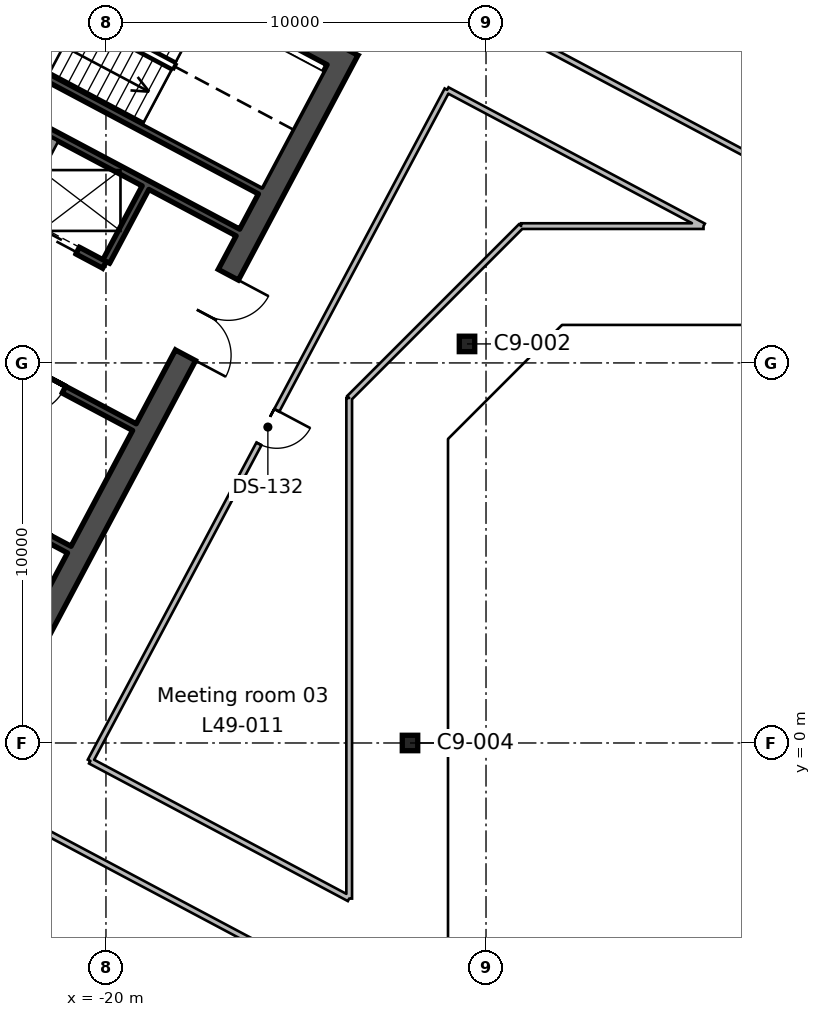
"""IFC4 building model, lengths in metres.
Left out: names, types, materials, properties, quantities, classifications, styles, units other than length and angle.
Written with IfcOpenShell. Run it as: python <this file> out.ifc"""

import sys

from ifc_helpers import new_model, si_unit, direction, frame, frame_2d, origin, origin_2d, place, context, subcontext, project, spatial, rectangle, hollow_rectangle, extrude, element, fill, save


model = new_model("IFC4")
c1 = context("Model", 3, precision=1e-05, world=origin(), true_north=direction((0.0, 1.0)))
c2 = subcontext(c1, "Body", "Model", "MODEL_VIEW")
j1 = project(units=[si_unit("LENGTHUNIT", "METRE"), si_unit("PLANEANGLEUNIT", "RADIAN")], contexts=[c1])
p1 = place(None, origin())
s1 = spatial("IfcSite", under=j1, at=p1, CompositionType="ELEMENT")
p2 = place(p1, origin())
s2 = spatial("IfcBuilding", under=s1, at=p2, CompositionType="ELEMENT")
p3 = place(p2, frame((0.0, 0.0, 224.7)))
s3 = spatial("IfcBuildingStorey", under=s2, at=p3, CompositionType="ELEMENT", Elevation=224.7)
for number, where, z_axis, x_axis in (
    (1, (-12.0, 0.0, 0.0), (0.0, 0.0, 1.0), (1.0, 0.0, 0.0)),
    (2, (-10.5, 10.5, 0.0), (0.0, 0.0, 1.0), (1.0, 0.0, 0.0)),
):
    element("IfcColumn", number, at=place(p3, frame(where, z_axis=z_axis, x_axis=x_axis)), inside=s3, PredefinedType="COLUMN", context=c2, shape_type="SweptSolid", body=[
        extrude(hollow_rectangle(XDim=0.406, YDim=0.406, WallThickness=0.015, InnerFilletRadius=0.007, OuterFilletRadius=0.022, at=origin_2d()), origin(), (0.0, 0.0, 1.0), 3.9),
    ])
p4 = place(p3, frame((-13.635, 18.236, 0.0), z_axis=(0.0, 0.0, 1.0), x_axis=(-0.469478769487, -0.88294376095, 0.0)))
e3 = element("IfcWall", 3, at=p4, inside=s3, PredefinedType="SHEAR", context=c2, shape_type="SweptSolid", body=[
    extrude(rectangle(XDim=19.4, YDim=0.6, at=frame_2d((9.7, 0.0))), origin(), (0.0, 0.0, 1.0), 3.9),
])
p5 = place(p4, frame((6.7, 0.0, 0.0)))
e4 = element("IfcOpeningElement", 4, at=p5, cuts=e3, PredefinedType="OPENING", context=c2, shape_type="SweptSolid", body=[
    extrude(rectangle(XDim=2.4, YDim=2.4, at=frame_2d((1.2, 1.2))), frame((0.0, 0.31, 0.0), z_axis=(0.0, -1.0, 0.0), x_axis=(1.0, 0.0, 0.0)), (0.0, 0.0, 1.0), 0.62),
])
p6 = place(p3, frame((-14.041, 18.112, 0.0), z_axis=(0.0, 0.0, 1.0), x_axis=(-0.882947755831, 0.46947125628, 0.0)))
e5 = element("IfcWall", 5, at=p6, inside=s3, PredefinedType="SHEAR", context=c2, shape_type="SweptSolid", body=[
    extrude(rectangle(XDim=20.2, YDim=0.6, at=frame_2d((10.1, 0.0))), origin(), (0.0, 0.0, 1.0), 3.9),
])
p7 = place(p3, frame((-18.96, 14.611, 0.0), z_axis=(0.0, 0.0, 1.0), x_axis=(-0.4694473164, -0.882960484464, 0.0)))
e6 = element("IfcWall", 6, at=p7, inside=s3, PredefinedType="SHEAR", context=c2, shape_type="SweptSolid", body=[
    extrude(rectangle(XDim=2.2, YDim=0.2, at=frame_2d((1.1, 0.0))), origin(), (0.0, 0.0, 1.0), 3.9),
])
p8 = place(p3, frame((-21.344, 15.879, 0.0), z_axis=(0.0, 0.0, 1.0), x_axis=(-0.4694473164, -0.882960484464, 0.0)))
e7 = element("IfcWall", 7, at=p8, inside=s3, PredefinedType="SOLIDWALL", context=c2, shape_type="SweptSolid", body=[
    extrude(rectangle(XDim=2.2, YDim=0.2, at=frame_2d((1.1, 0.0))), origin(), (0.0, 0.0, 1.0), 3.9),
])
p9 = place(p3, frame((-21.333, 21.649, 0.0), z_axis=(0.0, 0.0, 1.0), x_axis=(-0.469494272526, -0.882935517501, 0.0)))
e8 = element("IfcWall", 8, at=p9, inside=s3, PredefinedType="SHEAR", context=c2, shape_type="SweptSolid", body=[
    extrude(rectangle(XDim=7.3, YDim=0.2, at=frame_2d((3.65, 0.0))), origin(), (0.0, 0.0, 1.0), 3.9),
])
p10 = place(p9, frame((1.3, 0.0, 0.0)))
e9 = element("IfcOpeningElement", 9, at=p10, cuts=e8, PredefinedType="OPENING", context=c2, shape_type="SweptSolid", body=[
    extrude(rectangle(XDim=1.2, YDim=2.1, at=frame_2d((0.6, 1.05))), frame((0.0, 0.11, 0.0), z_axis=(0.0, -1.0, 0.0), x_axis=(1.0, 0.0, 0.0)), (0.0, 0.0, 1.0), 0.22),
])
p11 = place(p3, frame((-15.942, 14.536, 0.0), z_axis=(0.0, 0.0, 1.0), x_axis=(-0.882946947542, 0.469472776449, 0.0)))
e10 = element("IfcWall", 10, at=p11, inside=s3, PredefinedType="SHEAR", context=c2, shape_type="SweptSolid", body=[
    extrude(rectangle(XDim=8.0, YDim=0.2, at=frame_2d((4.0, 0.0))), origin(), (0.0, 0.0, 1.0), 3.9),
])
p12 = place(p3, frame((-16.529, 13.432, 0.0), z_axis=(0.0, 0.0, 1.0), x_axis=(-0.88295287151, 0.469461634952, 0.0)))
e11 = element("IfcWall", 11, at=p12, inside=s3, PredefinedType="SHEAR", context=c2, shape_type="SweptSolid", body=[
    extrude(rectangle(XDim=8.0, YDim=0.2, at=frame_2d((4.0, 0.0))), origin(), (0.0, 0.0, 1.0), 3.9),
])
p13 = place(p3, frame((-20.04, 12.581, 0.0), z_axis=(0.0, 0.0, 1.0), x_axis=(-0.882942972946, 0.469480251476, 0.0)))
e12 = element("IfcWall", 12, at=p13, inside=s3, PredefinedType="SHEAR", context=c2, shape_type="SweptSolid", body=[
    extrude(rectangle(XDim=5.4, YDim=0.2, at=frame_2d((2.7, 0.0))), origin(), (0.0, 0.0, 1.0), 3.9),
])
p14 = place(p13, frame((0.8, 0.0, 0.0)))
e13 = element("IfcOpeningElement", 13, at=p14, cuts=e12, PredefinedType="OPENING", context=c2, shape_type="SweptSolid", body=[
    extrude(rectangle(XDim=1.1, YDim=2.1, at=frame_2d((0.55, 1.05))), frame((0.0, 0.11, 0.0), z_axis=(0.0, -1.0, 0.0), x_axis=(1.0, 0.0, 0.0)), (0.0, 0.0, 1.0), 0.22),
])
p15 = place(p13, frame((3.5, 0.0, 0.0)))
e14 = element("IfcOpeningElement", 14, at=p15, cuts=e12, PredefinedType="OPENING", context=c2, shape_type="SweptSolid", body=[
    extrude(rectangle(XDim=1.1, YDim=2.1, at=frame_2d((0.55, 1.05))), frame((0.0, 0.11, 0.0), z_axis=(0.0, -1.0, 0.0), x_axis=(1.0, 0.0, 0.0)), (0.0, 0.0, 1.0), 0.22),
])
p16 = place(p3, frame((-19.252, 8.311, 0.0), z_axis=(0.0, 0.0, 1.0), x_axis=(-0.882955722218, 0.469456273365, 0.0)))
e15 = element("IfcWall", 15, at=p16, inside=s3, PredefinedType="SHEAR", context=c2, shape_type="SweptSolid", body=[
    extrude(rectangle(XDim=10.0, YDim=0.2, at=frame_2d((5.0, 0.0))), origin(), (0.0, 0.0, 1.0), 3.9),
])
p17 = place(p16, frame((2.1, 0.0, 0.0)))
e16 = element("IfcOpeningElement", 16, at=p17, cuts=e15, PredefinedType="OPENING", context=c2, shape_type="SweptSolid", body=[
    extrude(rectangle(XDim=1.2, YDim=2.1, at=frame_2d((0.6, 1.05))), frame((0.0, 0.11, 0.0), z_axis=(0.0, -1.0, 0.0), x_axis=(1.0, 0.0, 0.0)), (0.0, 0.0, 1.0), 0.22),
])
p18 = place(p16, frame((6.85, 0.0, 0.0)))
e17 = element("IfcOpeningElement", 17, at=p18, cuts=e15, PredefinedType="OPENING", context=c2, shape_type="SweptSolid", body=[
    extrude(rectangle(XDim=0.9, YDim=2.1, at=frame_2d((0.45, 1.05))), frame((0.0, 0.11, 0.0), z_axis=(0.0, -1.0, 0.0), x_axis=(1.0, 0.0, 0.0)), (0.0, 0.0, 1.0), 0.22),
])
p19 = place(p3, frame((-20.965, 5.088, 0.0), z_axis=(0.0, 0.0, 1.0), x_axis=(-0.882925986334, 0.469512196493, 0.0)))
e18 = element("IfcWall", 18, at=p19, inside=s3, PredefinedType="SHEAR", context=c2, shape_type="SweptSolid", body=[
    extrude(rectangle(XDim=4.5, YDim=0.2, at=frame_2d((2.25, 0.0))), origin(), (0.0, 0.0, 1.0), 3.9),
])
p20 = place(p19, frame((0.6, 0.0, 0.0)))
e19 = element("IfcOpeningElement", 19, at=p20, cuts=e18, PredefinedType="OPENING", context=c2, shape_type="SweptSolid", body=[
    extrude(rectangle(XDim=1.1, YDim=2.1, at=frame_2d((0.55, 1.05))), frame((0.0, 0.11, 0.0), z_axis=(0.0, -1.0, 0.0), x_axis=(1.0, 0.0, 0.0)), (0.0, 0.0, 1.0), 0.22),
])
p21 = place(p3, frame((-48.812, 39.771, 0.0), z_axis=(0.0, 0.0, 1.0), x_axis=(0.882945384259, -0.469475716535, 0.0)))
e20 = element("IfcWall", 20, at=p21, inside=s3, PredefinedType="PARTITIONING", context=c2, shape_type="SweptSolid", body=[
    extrude(rectangle(XDim=55.283, YDim=0.15, at=frame_2d((27.642, 0.0))), origin(), (0.0, 0.0, 1.0), 3.54),
])
p22 = place(p21, frame((39.55, 0.0, 0.0)))
e21 = element("IfcOpeningElement", 21, at=p22, cuts=e20, PredefinedType="OPENING", context=c2, shape_type="SweptSolid", body=[
    extrude(rectangle(XDim=1.0, YDim=2.1, at=frame_2d((0.5, 1.05))), frame((0.0, 0.085, 0.0), z_axis=(0.0, -1.0, 0.0), x_axis=(1.0, 0.0, 0.0)), (0.0, 0.0, 1.0), 0.17),
])
p23 = place(p21, frame((27.15, 0.0, 0.0)))
e22 = element("IfcOpeningElement", 22, at=p23, cuts=e20, PredefinedType="OPENING", context=c2, shape_type="SweptSolid", body=[
    extrude(rectangle(XDim=1.0, YDim=2.1, at=frame_2d((0.5, 1.05))), frame((0.0, 0.085, 0.0), z_axis=(0.0, -1.0, 0.0), x_axis=(1.0, 0.0, 0.0)), (0.0, 0.0, 1.0), 0.17),
])
p24 = place(p21, frame((21.25, 0.0, 0.0)))
e23 = element("IfcOpeningElement", 23, at=p24, cuts=e20, PredefinedType="OPENING", context=c2, shape_type="SweptSolid", body=[
    extrude(rectangle(XDim=1.0, YDim=2.1, at=frame_2d((0.5, 1.05))), frame((0.0, 0.085, 0.0), z_axis=(0.0, -1.0, 0.0), x_axis=(1.0, 0.0, 0.0)), (0.0, 0.0, 1.0), 0.17),
])
p25 = place(p21, frame((15.55, 0.0, 0.0)))
e24 = element("IfcOpeningElement", 24, at=p25, cuts=e20, PredefinedType="OPENING", context=c2, shape_type="SweptSolid", body=[
    extrude(rectangle(XDim=1.0, YDim=2.1, at=frame_2d((0.5, 1.05))), frame((0.0, 0.085, 0.0), z_axis=(0.0, -1.0, 0.0), x_axis=(1.0, 0.0, 0.0)), (0.0, 0.0, 1.0), 0.17),
])
p26 = place(p3, frame((-13.6, -6.586, 0.0), z_axis=(0.0, 0.0, 1.0), x_axis=(-0.882948083203, 0.469470640582, 0.0)))
e25 = element("IfcWall", 25, at=p26, inside=s3, PredefinedType="PARTITIONING", context=c2, shape_type="SweptSolid", body=[
    extrude(rectangle(XDim=36.556, YDim=0.15, at=frame_2d((18.278, 0.0))), origin(), (0.0, 0.0, 1.0), 3.54),
])
p27 = place(p26, frame((34.25, 0.0, 0.0)))
e26 = element("IfcOpeningElement", 26, at=p27, cuts=e25, PredefinedType="OPENING", context=c2, shape_type="SweptSolid", body=[
    extrude(rectangle(XDim=1.0, YDim=2.1, at=frame_2d((0.5, 1.05))), frame((0.0, 0.085, 0.0), z_axis=(0.0, -1.0, 0.0), x_axis=(1.0, 0.0, 0.0)), (0.0, 0.0, 1.0), 0.17),
])
p28 = place(p26, frame((25.65, 0.0, 0.0)))
e27 = element("IfcOpeningElement", 27, at=p28, cuts=e25, PredefinedType="OPENING", context=c2, shape_type="SweptSolid", body=[
    extrude(rectangle(XDim=1.0, YDim=2.1, at=frame_2d((0.5, 1.05))), frame((0.0, 0.085, 0.0), z_axis=(0.0, -1.0, 0.0), x_axis=(1.0, 0.0, 0.0)), (0.0, 0.0, 1.0), 0.17),
])
p29 = place(p26, frame((17.75, 0.0, 0.0)))
e28 = element("IfcOpeningElement", 28, at=p29, cuts=e25, PredefinedType="OPENING", context=c2, shape_type="SweptSolid", body=[
    extrude(rectangle(XDim=1.0, YDim=2.1, at=frame_2d((0.5, 1.05))), frame((0.0, 0.085, 0.0), z_axis=(0.0, -1.0, 0.0), x_axis=(1.0, 0.0, 0.0)), (0.0, 0.0, 1.0), 0.17),
])
p30 = place(p3, frame((-20.411, -0.473, 0.0), z_axis=(0.0, 0.0, 1.0), x_axis=(0.469451816494, 0.882958091865, 0.0)))
e29 = element("IfcWall", 29, at=p30, inside=s3, PredefinedType="PARTITIONING", context=c2, shape_type="SweptSolid", body=[
    extrude(rectangle(XDim=20.0, YDim=0.15, at=frame_2d((10.0, 0.0))), origin(), (0.0, 0.0, 1.0), 3.54),
])
p31 = place(p30, frame((9.45, 0.0, 0.0)))
e30 = element("IfcOpeningElement", 30, at=p31, cuts=e29, PredefinedType="OPENING", context=c2, shape_type="SweptSolid", body=[
    extrude(rectangle(XDim=1.0, YDim=2.1, at=frame_2d((0.5, 1.05))), frame((0.0, 0.085, 0.0), z_axis=(0.0, -1.0, 0.0), x_axis=(1.0, 0.0, 0.0)), (0.0, 0.0, 1.0), 0.17),
])
p32 = place(p3, frame((-11.022, 17.186, 0.0), z_axis=(0.0, 0.0, 1.0), x_axis=(0.882967947403, -0.469433279453, 0.0)))
e31 = element("IfcWall", 31, at=p32, inside=s3, PredefinedType="PARTITIONING", context=c2, shape_type="SweptSolid", body=[
    extrude(rectangle(XDim=7.639, YDim=0.15, at=frame_2d((3.819, 0.0))), origin(), (0.0, 0.0, 1.0), 3.54),
])
p33 = place(p3, frame((-4.277, 13.6, 0.0), z_axis=(0.0, 0.0, 1.0), x_axis=(-1.0, 0.0, 0.0)))
e32 = element("IfcWall", 32, at=p33, inside=s3, PredefinedType="PARTITIONING", context=c2, shape_type="SweptSolid", body=[
    extrude(rectangle(XDim=4.8, YDim=0.15, at=frame_2d((2.4, 0.0))), origin(), (0.0, 0.0, 1.0), 3.54),
])
p34 = place(p3, frame((-9.077, 13.6, 0.0), z_axis=(0.0, 0.0, 1.0), x_axis=(-0.707106781187, -0.707106781187, 0.0)))
e33 = element("IfcWall", 33, at=p34, inside=s3, PredefinedType="PARTITIONING", context=c2, shape_type="SweptSolid", body=[
    extrude(rectangle(XDim=6.397, YDim=0.15, at=frame_2d((3.198, 0.0))), origin(), (0.0, 0.0, 1.0), 3.54),
])
p35 = place(p3, frame((-13.6, 9.077, 0.0), z_axis=(0.0, 0.0, 1.0), x_axis=(0.0, -1.0, 0.0)))
e34 = element("IfcWall", 34, at=p35, inside=s3, PredefinedType="PARTITIONING", context=c2, shape_type="SweptSolid", body=[
    extrude(rectangle(XDim=13.171, YDim=0.15, at=frame_2d((6.585, 0.0))), origin(), (0.0, 0.0, 1.0), 3.54),
])
p36 = place(p3, frame((-13.6, -4.094, 0.0), z_axis=(0.0, 0.0, 1.0), x_axis=(-0.882961998231, 0.469444469218, 0.0)))
e35 = element("IfcWall", 35, at=p36, inside=s3, PredefinedType="PARTITIONING", context=c2, shape_type="SweptSolid", body=[
    extrude(rectangle(XDim=7.714, YDim=0.15, at=frame_2d((3.857, 0.0))), origin(), (0.0, 0.0, 1.0), 3.54),
])
p37 = place(p5, origin())
e36 = element("IfcDoor", 36, at=p37, inside=s3, OperationType="DOUBLE_DOOR_SINGLE_SWING", PredefinedType="DOOR", context=c2, shape_type="SweptSolid", body=[
    extrude(rectangle(XDim=2.4, YDim=2.4, at=frame_2d((1.2, 1.2))), frame((0.0, 0.025, 0.0), z_axis=(0.0, -1.0, 0.0), x_axis=(1.0, 0.0, 0.0)), (0.0, 0.0, 1.0), 0.05),
])
fill(e4, e36)
p38 = place(p17, origin())
e37 = element("IfcDoor", 37, at=p38, inside=s3, OperationType="SINGLE_SWING_RIGHT", PredefinedType="DOOR", context=c2, shape_type="SweptSolid", body=[
    extrude(rectangle(XDim=1.2, YDim=2.1, at=frame_2d((0.6, 1.05))), frame((0.0, 0.025, 0.0), z_axis=(0.0, -1.0, 0.0), x_axis=(1.0, 0.0, 0.0)), (0.0, 0.0, 1.0), 0.05),
])
fill(e16, e37)
p39 = place(p14, origin())
e38 = element("IfcDoor", 38, at=p39, inside=s3, OperationType="DOUBLE_DOOR_SLIDING", PredefinedType="DOOR", context=c2, shape_type="SweptSolid", body=[
    extrude(rectangle(XDim=1.1, YDim=2.1, at=frame_2d((0.55, 1.05))), frame((0.0, 0.025, 0.0), z_axis=(0.0, -1.0, 0.0), x_axis=(1.0, 0.0, 0.0)), (0.0, 0.0, 1.0), 0.05),
])
fill(e13, e38)
p40 = place(p31, frame((1.0, 0.0, 0.0), z_axis=(0.0, 0.0, 1.0), x_axis=(-1.0, 0.0, 0.0)))
e39 = element("IfcDoor", 39, at=p40, inside=s3, OperationType="SINGLE_SWING_LEFT", PredefinedType="DOOR", context=c2, shape_type="SweptSolid", body=[
    extrude(rectangle(XDim=1.0, YDim=2.1, at=frame_2d((0.5, 1.05))), frame((0.0, 0.025, 0.0), z_axis=(0.0, -1.0, 0.0), x_axis=(1.0, 0.0, 0.0)), (0.0, 0.0, 1.0), 0.05),
])
fill(e30, e39)
save(model, sys.argv[1])
